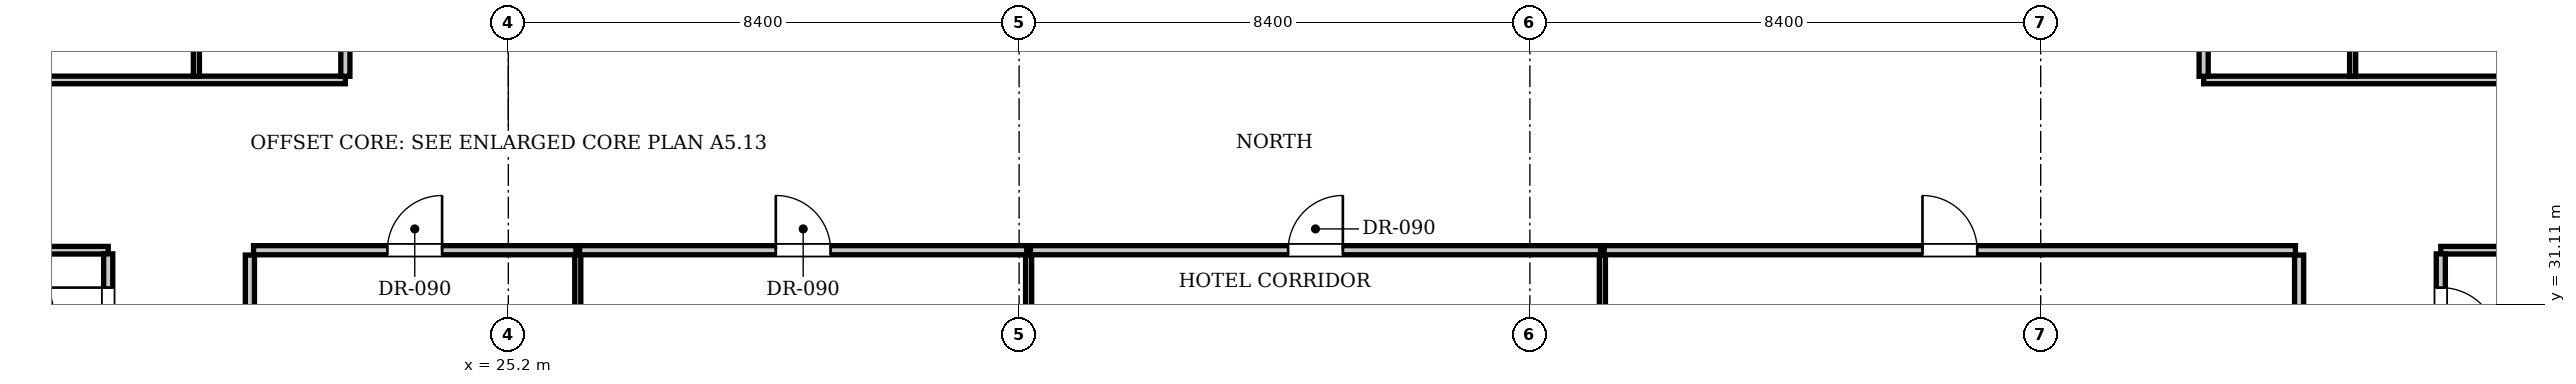
"""IFC4 building model, lengths in metres.
Left out: names, types, materials, properties, quantities, classifications, styles, units other than length and angle.
Written with IfcOpenShell. Run it as: python <this file> out.ifc"""

import sys

from ifc_helpers import new_model, si_unit, direction, frame, frame_2d, origin, place, context, subcontext, project, spatial, rectangle, extrude, element, fill, save


model = new_model("IFC4")
c1 = context("Model", 3, precision=1e-05, world=origin(), true_north=direction((0.0, 1.0)))
c2 = subcontext(c1, "Body", "Model", "MODEL_VIEW")
j1 = project(units=[si_unit("LENGTHUNIT", "METRE"), si_unit("PLANEANGLEUNIT", "RADIAN")], contexts=[c1])
p1 = place(None, origin())
s1 = spatial("IfcSite", under=j1, at=p1, CompositionType="ELEMENT")
p2 = place(p1, origin())
s2 = spatial("IfcBuilding", under=s1, at=p2, CompositionType="ELEMENT")
p3 = place(p2, frame((0.0, 0.0, 61.6)))
s3 = spatial("IfcBuildingStorey", under=s2, at=p3, CompositionType="ELEMENT", Elevation=61.6)
p4 = place(p3, frame((20.95, 23.98, 0.0), z_axis=(0.0, 0.0, 1.0), x_axis=(0.0, 1.0, 0.0)))
e1 = element("IfcWall", 1, at=p4, inside=s3, PredefinedType="PARTITIONING", context=c2, shape_type="SweptSolid", body=[
    extrude(rectangle(XDim=7.94, YDim=0.15, at=frame_2d((3.97, 0.0))), origin(), (0.0, 0.0, 1.0), 3.255),
])
p5 = place(p3, frame((54.65, 23.98, 0.0), z_axis=(0.0, 0.0, 1.0), x_axis=(0.0, 1.0, 0.0)))
e2 = element("IfcWall", 2, at=p5, inside=s3, PredefinedType="PARTITIONING", context=c2, shape_type="SweptSolid", body=[
    extrude(rectangle(XDim=7.94, YDim=0.15, at=frame_2d((3.97, 0.0))), origin(), (0.0, 0.0, 1.0), 3.293),
])
p6 = place(p3, frame((21.01, 32.0, 0.0), z_axis=(0.0, 0.0, 1.0), x_axis=(1.0, 0.0, 0.0)))
e3 = element("IfcWall", 3, at=p6, inside=s3, PredefinedType="PARTITIONING", context=c2, shape_type="SweptSolid", body=[
    extrude(rectangle(XDim=5.302, YDim=0.15, at=frame_2d((2.651, 0.0))), origin(), (0.0, 0.0, 1.0), 3.61),
])
p7 = place(p6, frame((2.201, 0.0, 0.0)))
e4 = element("IfcOpeningElement", 4, at=p7, cuts=e3, PredefinedType="OPENING", context=c2, shape_type="SweptSolid", body=[
    extrude(rectangle(XDim=0.9, YDim=2.1, at=frame_2d((0.45, 1.05))), frame((0.0, 0.085, 0.0), z_axis=(0.0, -1.0, 0.0), x_axis=(1.0, 0.0, 0.0)), (0.0, 0.0, 1.0), 0.17),
])
p8 = place(p3, frame((26.342, 23.98, 0.0), z_axis=(0.0, 0.0, 1.0), x_axis=(0.0, 1.0, 0.0)))
e5 = element("IfcWall", 5, at=p8, inside=s3, PredefinedType="PARTITIONING", context=c2, shape_type="SweptSolid", body=[
    extrude(rectangle(XDim=7.94, YDim=0.1, at=frame_2d((3.97, 0.0))), origin(), (0.0, 0.0, 1.0), 3.61),
])
p9 = place(p3, frame((26.372, 32.0, 0.0), z_axis=(0.0, 0.0, 1.0), x_axis=(1.0, 0.0, 0.0)))
e6 = element("IfcWall", 6, at=p9, inside=s3, PredefinedType="PARTITIONING", context=c2, shape_type="SweptSolid", body=[
    extrude(rectangle(XDim=7.354, YDim=0.15, at=frame_2d((3.677, 0.0))), origin(), (0.0, 0.0, 1.0), 3.61),
])
p10 = place(p9, frame((3.227, 0.0, 0.0)))
e7 = element("IfcOpeningElement", 7, at=p10, cuts=e6, PredefinedType="OPENING", context=c2, shape_type="SweptSolid", body=[
    extrude(rectangle(XDim=0.9, YDim=2.1, at=frame_2d((0.45, 1.05))), frame((0.0, 0.085, 0.0), z_axis=(0.0, -1.0, 0.0), x_axis=(1.0, 0.0, 0.0)), (0.0, 0.0, 1.0), 0.17),
])
p11 = place(p3, frame((33.756, 23.98, 0.0), z_axis=(0.0, 0.0, 1.0), x_axis=(0.0, 1.0, 0.0)))
e8 = element("IfcWall", 8, at=p11, inside=s3, PredefinedType="PARTITIONING", context=c2, shape_type="SweptSolid", body=[
    extrude(rectangle(XDim=7.94, YDim=0.1, at=frame_2d((3.97, 0.0))), origin(), (0.0, 0.0, 1.0), 2.988),
])
p12 = place(p3, frame((33.786, 32.0, 0.0), z_axis=(0.0, 0.0, 1.0), x_axis=(1.0, 0.0, 0.0)))
e9 = element("IfcWall", 9, at=p12, inside=s3, PredefinedType="PARTITIONING", context=c2, shape_type="SweptSolid", body=[
    extrude(rectangle(XDim=9.376, YDim=0.15, at=frame_2d((4.688, 0.0))), origin(), (0.0, 0.0, 1.0), 3.61),
])
p13 = place(p12, frame((4.238, 0.0, 0.0)))
e10 = element("IfcOpeningElement", 10, at=p13, cuts=e9, PredefinedType="OPENING", context=c2, shape_type="SweptSolid", body=[
    extrude(rectangle(XDim=0.9, YDim=2.1, at=frame_2d((0.45, 1.05))), frame((0.0, 0.085, 0.0), z_axis=(0.0, -1.0, 0.0), x_axis=(1.0, 0.0, 0.0)), (0.0, 0.0, 1.0), 0.17),
])
p14 = place(p3, frame((43.192, 23.98, 0.0), z_axis=(0.0, 0.0, 1.0), x_axis=(0.0, 1.0, 0.0)))
e11 = element("IfcWall", 11, at=p14, inside=s3, PredefinedType="PARTITIONING", context=c2, shape_type="SweptSolid", body=[
    extrude(rectangle(XDim=7.94, YDim=0.1, at=frame_2d((3.97, 0.0))), origin(), (0.0, 0.0, 1.0), 3.61),
])
p15 = place(p3, frame((43.222, 32.0, 0.0), z_axis=(0.0, 0.0, 1.0), x_axis=(1.0, 0.0, 0.0)))
e12 = element("IfcWall", 12, at=p15, inside=s3, PredefinedType="PARTITIONING", context=c2, shape_type="SweptSolid", body=[
    extrude(rectangle(XDim=11.368, YDim=0.15, at=frame_2d((5.684, 0.0))), origin(), (0.0, 0.0, 1.0), 3.61),
])
p16 = place(p15, frame((5.234, 0.0, 0.0)))
e13 = element("IfcOpeningElement", 13, at=p16, cuts=e12, PredefinedType="OPENING", context=c2, shape_type="SweptSolid", body=[
    extrude(rectangle(XDim=0.9, YDim=2.1, at=frame_2d((0.45, 1.05))), frame((0.0, 0.085, 0.0), z_axis=(0.0, -1.0, 0.0), x_axis=(1.0, 0.0, 0.0)), (0.0, 0.0, 1.0), 0.17),
])
p17 = place(p3, frame((10.9, 32.0, 0.0), z_axis=(0.0, 0.0, 1.0), x_axis=(1.0, 0.0, 0.0)))
e14 = element("IfcWall", 14, at=p17, inside=s3, PredefinedType="PARTITIONING", context=c2, shape_type="SweptSolid", body=[
    extrude(rectangle(XDim=7.72, YDim=0.125, at=frame_2d((3.86, 0.0))), origin(), (0.0, 0.0, 1.0), 3.61),
])
p18 = place(p3, frame((56.98, 32.0, 0.0), z_axis=(0.0, 0.0, 1.0), x_axis=(1.0, 0.0, 0.0)))
e15 = element("IfcWall", 15, at=p18, inside=s3, PredefinedType="PARTITIONING", context=c2, shape_type="SweptSolid", body=[
    extrude(rectangle(XDim=7.72, YDim=0.125, at=frame_2d((3.86, 0.0))), origin(), (0.0, 0.0, 1.0), 3.61),
])
p19 = place(p3, frame((18.62, 29.88, 0.0), z_axis=(0.0, 0.0, 1.0), x_axis=(0.0, 1.0, 0.0)))
e16 = element("IfcWall", 16, at=p19, inside=s3, PredefinedType="PARTITIONING", context=c2, shape_type="SweptSolid", body=[
    extrude(rectangle(XDim=2.06, YDim=0.15, at=frame_2d((1.03, 0.0))), origin(), (0.0, 0.0, 1.0), 3.61),
])
p20 = place(p19, frame((0.555, 0.0, 0.0)))
e17 = element("IfcOpeningElement", 17, at=p20, cuts=e16, PredefinedType="OPENING", context=c2, shape_type="SweptSolid", body=[
    extrude(rectangle(XDim=0.95, YDim=2.15, at=frame_2d((0.475, 1.075))), frame((0.0, 0.085, 0.0), z_axis=(0.0, -1.0, 0.0), x_axis=(1.0, 0.0, 0.0)), (0.0, 0.0, 1.0), 0.17),
])
p21 = place(p3, frame((56.98, 29.88, 0.0), z_axis=(0.0, 0.0, 1.0), x_axis=(0.0, 1.0, 0.0)))
e18 = element("IfcWall", 18, at=p21, inside=s3, PredefinedType="PARTITIONING", context=c2, shape_type="SweptSolid", body=[
    extrude(rectangle(XDim=2.06, YDim=0.15, at=frame_2d((1.03, 0.0))), origin(), (0.0, 0.0, 1.0), 3.61),
])
p22 = place(p21, frame((0.555, 0.0, 0.0)))
e19 = element("IfcOpeningElement", 19, at=p22, cuts=e18, PredefinedType="OPENING", context=c2, shape_type="SweptSolid", body=[
    extrude(rectangle(XDim=0.95, YDim=2.15, at=frame_2d((0.475, 1.075))), frame((0.0, 0.085, 0.0), z_axis=(0.0, -1.0, 0.0), x_axis=(1.0, 0.0, 0.0)), (0.0, 0.0, 1.0), 0.17),
])
p23 = place(p3, frame((10.9, 34.8, 0.0), z_axis=(0.0, 0.0, 1.0), x_axis=(1.0, 0.0, 0.0)))
e20 = element("IfcWall", 20, at=p23, inside=s3, PredefinedType="PARTITIONING", context=c2, shape_type="SweptSolid", body=[
    extrude(rectangle(XDim=11.62, YDim=0.125, at=frame_2d((5.81, 0.0))), origin(), (0.0, 0.0, 1.0), 3.61),
])
p24 = place(p3, frame((53.08, 34.8, 0.0), z_axis=(0.0, 0.0, 1.0), x_axis=(1.0, 0.0, 0.0)))
e21 = element("IfcWall", 21, at=p24, inside=s3, PredefinedType="PARTITIONING", context=c2, shape_type="SweptSolid", body=[
    extrude(rectangle(XDim=11.62, YDim=0.125, at=frame_2d((5.81, 0.0))), origin(), (0.0, 0.0, 1.0), 3.61),
])
p25 = place(p3, frame((22.52, 34.86, 0.0), z_axis=(0.0, 0.0, 1.0), x_axis=(0.0, 1.0, 0.0)))
e22 = element("IfcWall", 22, at=p25, inside=s3, PredefinedType="PARTITIONING", context=c2, shape_type="SweptSolid", body=[
    extrude(rectangle(XDim=2.29, YDim=0.15, at=frame_2d((1.145, 0.0))), origin(), (0.0, 0.0, 1.0), 3.61),
])
p26 = place(p3, frame((20.07, 34.86, 0.0), z_axis=(0.0, 0.0, 1.0), x_axis=(0.0, 1.0, 0.0)))
e23 = element("IfcWall", 23, at=p26, inside=s3, PredefinedType="PARTITIONING", context=c2, shape_type="SweptSolid", body=[
    extrude(rectangle(XDim=2.29, YDim=0.1, at=frame_2d((1.145, 0.0))), origin(), (0.0, 0.0, 1.0), 3.61),
])
p27 = place(p3, frame((53.08, 34.86, 0.0), z_axis=(0.0, 0.0, 1.0), x_axis=(0.0, 1.0, 0.0)))
e24 = element("IfcWall", 24, at=p27, inside=s3, PredefinedType="PARTITIONING", context=c2, shape_type="SweptSolid", body=[
    extrude(rectangle(XDim=2.29, YDim=0.15, at=frame_2d((1.145, 0.0))), origin(), (0.0, 0.0, 1.0), 3.61),
])
p28 = place(p3, frame((55.53, 34.86, 0.0), z_axis=(0.0, 0.0, 1.0), x_axis=(0.0, 1.0, 0.0)))
e25 = element("IfcWall", 25, at=p28, inside=s3, PredefinedType="PARTITIONING", context=c2, shape_type="SweptSolid", body=[
    extrude(rectangle(XDim=2.29, YDim=0.1, at=frame_2d((1.145, 0.0))), origin(), (0.0, 0.0, 1.0), 3.61),
])
p29 = place(p7, origin())
e26 = element("IfcDoor", 26, at=p29, inside=s3, OperationType="SINGLE_SWING_RIGHT", PredefinedType="DOOR", context=c2, shape_type="SweptSolid", body=[
    extrude(rectangle(XDim=0.9, YDim=2.1, at=frame_2d((0.45, 1.05))), frame((0.0, 0.025, 0.0), z_axis=(0.0, -1.0, 0.0), x_axis=(1.0, 0.0, 0.0)), (0.0, 0.0, 1.0), 0.05),
])
fill(e4, e26)
p30 = place(p10, origin())
e27 = element("IfcDoor", 27, at=p30, inside=s3, OperationType="SINGLE_SWING_LEFT", PredefinedType="DOOR", context=c2, shape_type="SweptSolid", body=[
    extrude(rectangle(XDim=0.9, YDim=2.1, at=frame_2d((0.45, 1.05))), frame((0.0, 0.025, 0.0), z_axis=(0.0, -1.0, 0.0), x_axis=(1.0, 0.0, 0.0)), (0.0, 0.0, 1.0), 0.05),
])
fill(e7, e27)
p31 = place(p13, origin())
e28 = element("IfcDoor", 28, at=p31, inside=s3, OperationType="SINGLE_SWING_RIGHT", PredefinedType="DOOR", context=c2, shape_type="SweptSolid", body=[
    extrude(rectangle(XDim=0.9, YDim=2.1, at=frame_2d((0.45, 1.05))), frame((0.0, 0.025, 0.0), z_axis=(0.0, -1.0, 0.0), x_axis=(1.0, 0.0, 0.0)), (0.0, 0.0, 1.0), 0.05),
])
fill(e10, e28)
p32 = place(p16, origin())
e29 = element("IfcDoor", 29, at=p32, inside=s3, OperationType="SINGLE_SWING_LEFT", PredefinedType="DOOR", context=c2, shape_type="SweptSolid", body=[
    extrude(rectangle(XDim=0.9, YDim=2.1, at=frame_2d((0.45, 1.05))), frame((0.0, 0.025, 0.0), z_axis=(0.0, -1.0, 0.0), x_axis=(1.0, 0.0, 0.0)), (0.0, 0.0, 1.0), 0.05),
])
fill(e13, e29)
p33 = place(p20, origin())
e30 = element("IfcDoor", 30, at=p33, inside=s3, OperationType="SINGLE_SWING_RIGHT", PredefinedType="DOOR", context=c2, shape_type="SweptSolid", body=[
    extrude(rectangle(XDim=0.95, YDim=2.15, at=frame_2d((0.475, 1.075))), frame((0.0, 0.025, 0.0), z_axis=(0.0, -1.0, 0.0), x_axis=(1.0, 0.0, 0.0)), (0.0, 0.0, 1.0), 0.05),
])
fill(e17, e30)
p34 = place(p22, frame((0.95, 0.0, 0.0), z_axis=(0.0, 0.0, 1.0), x_axis=(-1.0, 0.0, 0.0)))
e31 = element("IfcDoor", 31, at=p34, inside=s3, OperationType="SINGLE_SWING_RIGHT", PredefinedType="DOOR", context=c2, shape_type="SweptSolid", body=[
    extrude(rectangle(XDim=0.95, YDim=2.15, at=frame_2d((0.475, 1.075))), frame((0.0, 0.025, 0.0), z_axis=(0.0, -1.0, 0.0), x_axis=(1.0, 0.0, 0.0)), (0.0, 0.0, 1.0), 0.05),
])
fill(e19, e31)
save(model, sys.argv[1])
